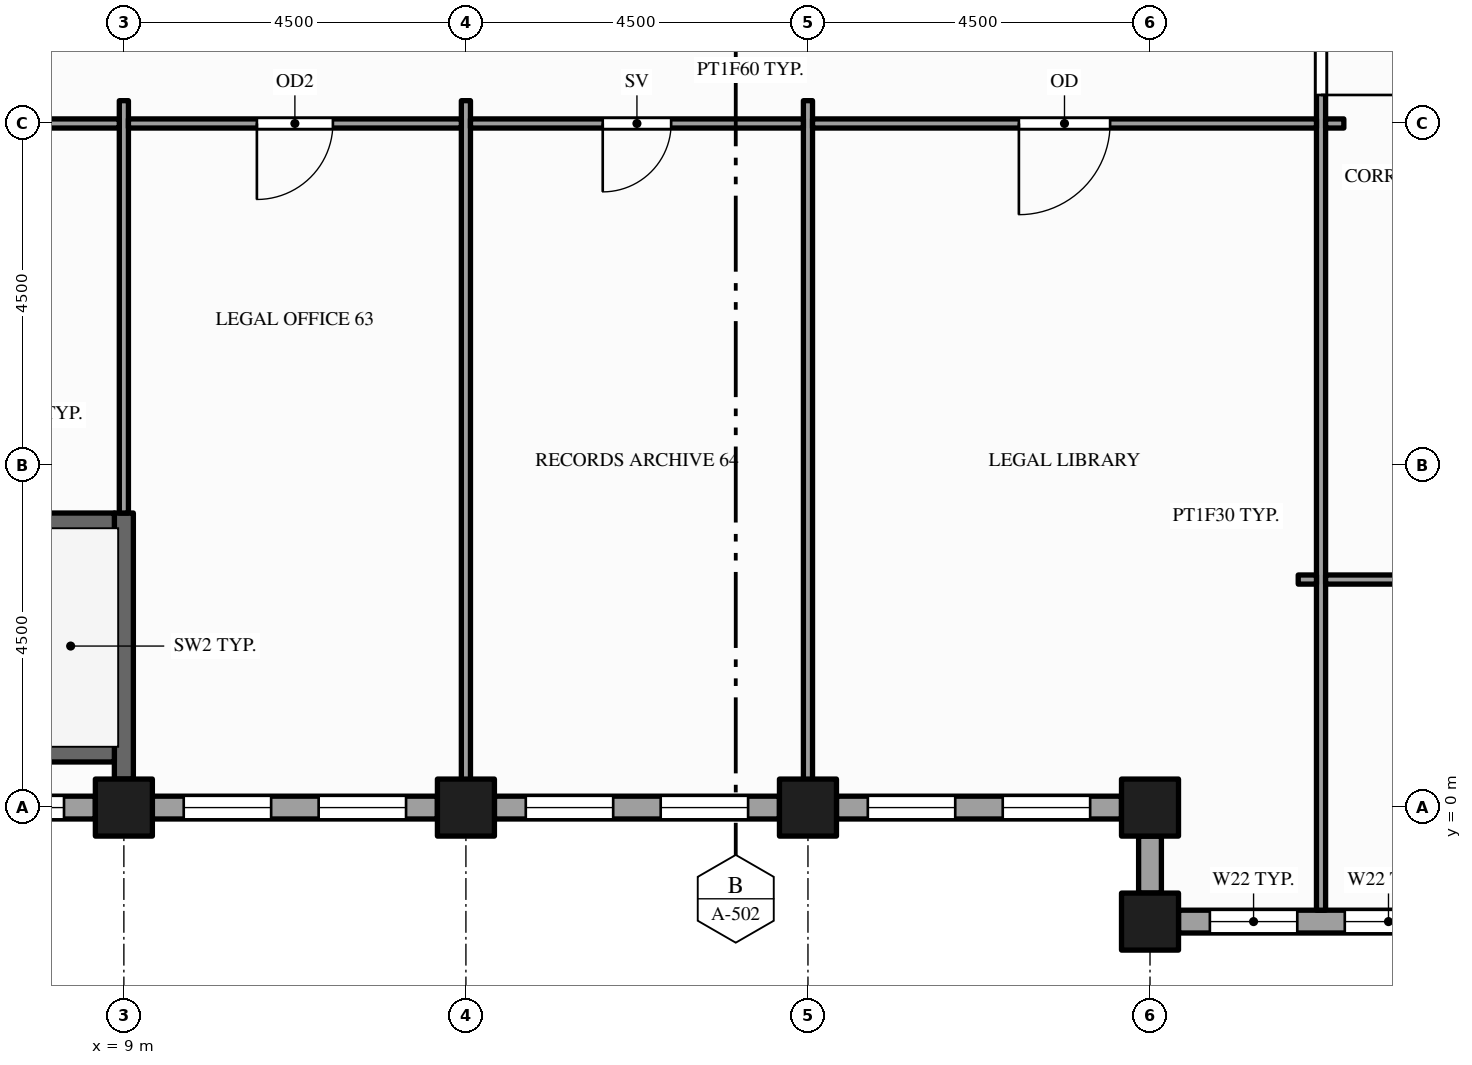
"""IFC4 building model, lengths in metres.
Left out: names, types, materials, properties, quantities, classifications, styles, units other than length and angle.
Written with IfcOpenShell. Run it as: python <this file> out.ifc"""

import sys

from ifc_helpers import new_model, si_unit, direction, frame, frame_2d, origin, origin_2d, place, context, subcontext, project, spatial, rectangle, hollow_rectangle, extrude, element, fill, save


model = new_model("IFC4")
c1 = context("Model", 3, precision=1e-05, world=origin(), true_north=direction((0.0, 1.0)))
c2 = subcontext(c1, "Body", "Model", "MODEL_VIEW")
j1 = project(units=[si_unit("LENGTHUNIT", "METRE"), si_unit("PLANEANGLEUNIT", "RADIAN")], contexts=[c1])
p1 = place(None, origin())
s1 = spatial("IfcSite", under=j1, at=p1, CompositionType="ELEMENT")
p2 = place(p1, origin())
s2 = spatial("IfcBuilding", under=s1, at=p2, CompositionType="ELEMENT")
p3 = place(p2, frame((0.0, 0.0, 195.0)))
s3 = spatial("IfcBuildingStorey", under=s2, at=p3, CompositionType="ELEMENT", Elevation=195.0)
for number, where, z_axis, x_axis in (
    (1, (9.0, 0.0, -0.15), (0.0, 0.0, 1.0), (1.0, 0.0, 0.0)),
    (2, (13.5, 0.0, -0.15), (0.0, 0.0, 1.0), (1.0, 0.0, 0.0)),
    (3, (18.0, 0.0, -0.15), (0.0, 0.0, 1.0), (1.0, 0.0, 0.0)),
    (4, (22.5, -1.5, -0.15), (0.0, 0.0, 1.0), (1.0, 0.0, 0.0)),
    (5, (22.5, 0.0, -0.15), (0.0, 0.0, 1.0), (1.0, 0.0, 0.0)),
):
    element("IfcColumn", number, at=place(p3, frame(where, z_axis=z_axis, x_axis=x_axis)), inside=s3, PredefinedType="COLUMN", context=c2, shape_type="SweptSolid", body=[
        extrude(hollow_rectangle(XDim=0.75, YDim=0.75, WallThickness=0.036, at=origin_2d()), origin(), (0.0, 0.0, 1.0), 4.0),
    ])
p4 = place(p3, frame((22.875, -1.5, 0.0), z_axis=(0.0, 0.0, 1.0), x_axis=(1.0, 0.0, 0.0)))
e6 = element("IfcWall", 6, at=p4, inside=s3, PredefinedType="STANDARD", context=c2, shape_type="SweptSolid", body=[
    extrude(rectangle(XDim=3.75, YDim=0.3, at=frame_2d((1.875, 0.0))), origin(), (0.0, 0.0, 1.0), 2.76),
])
p5 = place(p4, frame((0.413, 0.0, 0.9)))
e7 = element("IfcOpeningElement", 7, at=p5, cuts=e6, PredefinedType="OPENING", context=c2, shape_type="SweptSolid", body=[
    extrude(rectangle(XDim=1.15, YDim=1.5, at=frame_2d((0.575, 0.75))), frame((0.0, 0.16, 0.0), z_axis=(0.0, -1.0, 0.0), x_axis=(1.0, 0.0, 0.0)), (0.0, 0.0, 1.0), 0.32),
])
p6 = place(p4, frame((2.188, 0.0, 0.9)))
e8 = element("IfcOpeningElement", 8, at=p6, cuts=e6, PredefinedType="OPENING", context=c2, shape_type="SweptSolid", body=[
    extrude(rectangle(XDim=1.15, YDim=1.5, at=frame_2d((0.575, 0.75))), frame((0.0, 0.16, 0.0), z_axis=(0.0, -1.0, 0.0), x_axis=(1.0, 0.0, 0.0)), (0.0, 0.0, 1.0), 0.32),
])
p7 = place(p3, frame((4.875, 0.0, 0.0), z_axis=(0.0, 0.0, 1.0), x_axis=(1.0, 0.0, 0.0)))
e9 = element("IfcWall", 9, at=p7, inside=s3, PredefinedType="STANDARD", context=c2, shape_type="SweptSolid", body=[
    extrude(rectangle(XDim=3.75, YDim=0.3, at=frame_2d((1.875, 0.0))), origin(), (0.0, 0.0, 1.0), 3.157),
])
p8 = place(p7, frame((0.413, 0.0, 0.9)))
e10 = element("IfcOpeningElement", 10, at=p8, cuts=e9, PredefinedType="OPENING", context=c2, shape_type="SweptSolid", body=[
    extrude(rectangle(XDim=1.15, YDim=2.0, at=frame_2d((0.575, 1.0))), frame((0.0, 0.16, 0.0), z_axis=(0.0, -1.0, 0.0), x_axis=(1.0, 0.0, 0.0)), (0.0, 0.0, 1.0), 0.32),
])
p9 = place(p7, frame((2.188, 0.0, 0.9)))
e11 = element("IfcOpeningElement", 11, at=p9, cuts=e9, PredefinedType="OPENING", context=c2, shape_type="SweptSolid", body=[
    extrude(rectangle(XDim=1.15, YDim=2.0, at=frame_2d((0.575, 1.0))), frame((0.0, 0.16, 0.0), z_axis=(0.0, -1.0, 0.0), x_axis=(1.0, 0.0, 0.0)), (0.0, 0.0, 1.0), 0.32),
])
p10 = place(p3, frame((9.375, 0.0, 0.0), z_axis=(0.0, 0.0, 1.0), x_axis=(1.0, 0.0, 0.0)))
e12 = element("IfcWall", 12, at=p10, inside=s3, PredefinedType="STANDARD", context=c2, shape_type="SweptSolid", body=[
    extrude(rectangle(XDim=3.75, YDim=0.3, at=frame_2d((1.875, 0.0))), origin(), (0.0, 0.0, 1.0), 2.87),
])
p11 = place(p10, frame((0.413, 0.0, 0.9)))
e13 = element("IfcOpeningElement", 13, at=p11, cuts=e12, PredefinedType="OPENING", context=c2, shape_type="SweptSolid", body=[
    extrude(rectangle(XDim=1.15, YDim=1.75, at=frame_2d((0.575, 0.875))), frame((0.0, 0.16, 0.0), z_axis=(0.0, -1.0, 0.0), x_axis=(1.0, 0.0, 0.0)), (0.0, 0.0, 1.0), 0.32),
])
p12 = place(p10, frame((2.188, 0.0, 0.9)))
e14 = element("IfcOpeningElement", 14, at=p12, cuts=e12, PredefinedType="OPENING", context=c2, shape_type="SweptSolid", body=[
    extrude(rectangle(XDim=1.15, YDim=1.75, at=frame_2d((0.575, 0.875))), frame((0.0, 0.16, 0.0), z_axis=(0.0, -1.0, 0.0), x_axis=(1.0, 0.0, 0.0)), (0.0, 0.0, 1.0), 0.32),
])
p13 = place(p3, frame((13.875, 0.0, 0.0), z_axis=(0.0, 0.0, 1.0), x_axis=(1.0, 0.0, 0.0)))
e15 = element("IfcWall", 15, at=p13, inside=s3, PredefinedType="STANDARD", context=c2, shape_type="SweptSolid", body=[
    extrude(rectangle(XDim=3.75, YDim=0.3, at=frame_2d((1.875, 0.0))), origin(), (0.0, 0.0, 1.0), 2.87),
])
p14 = place(p13, frame((0.413, 0.0, 0.9)))
e16 = element("IfcOpeningElement", 16, at=p14, cuts=e15, PredefinedType="OPENING", context=c2, shape_type="SweptSolid", body=[
    extrude(rectangle(XDim=1.15, YDim=1.75, at=frame_2d((0.575, 0.875))), frame((0.0, 0.16, 0.0), z_axis=(0.0, -1.0, 0.0), x_axis=(1.0, 0.0, 0.0)), (0.0, 0.0, 1.0), 0.32),
])
p15 = place(p13, frame((2.188, 0.0, 0.9)))
e17 = element("IfcOpeningElement", 17, at=p15, cuts=e15, PredefinedType="OPENING", context=c2, shape_type="SweptSolid", body=[
    extrude(rectangle(XDim=1.15, YDim=1.75, at=frame_2d((0.575, 0.875))), frame((0.0, 0.16, 0.0), z_axis=(0.0, -1.0, 0.0), x_axis=(1.0, 0.0, 0.0)), (0.0, 0.0, 1.0), 0.32),
])
p16 = place(p3, frame((18.375, 0.0, 0.0), z_axis=(0.0, 0.0, 1.0), x_axis=(1.0, 0.0, 0.0)))
e18 = element("IfcWall", 18, at=p16, inside=s3, PredefinedType="STANDARD", context=c2, shape_type="SweptSolid", body=[
    extrude(rectangle(XDim=3.75, YDim=0.3, at=frame_2d((1.875, 0.0))), origin(), (0.0, 0.0, 1.0), 2.87),
])
p17 = place(p16, frame((0.413, 0.0, 0.9)))
e19 = element("IfcOpeningElement", 19, at=p17, cuts=e18, PredefinedType="OPENING", context=c2, shape_type="SweptSolid", body=[
    extrude(rectangle(XDim=1.15, YDim=1.75, at=frame_2d((0.575, 0.875))), frame((0.0, 0.16, 0.0), z_axis=(0.0, -1.0, 0.0), x_axis=(1.0, 0.0, 0.0)), (0.0, 0.0, 1.0), 0.32),
])
p18 = place(p16, frame((2.188, 0.0, 0.9)))
e20 = element("IfcOpeningElement", 20, at=p18, cuts=e18, PredefinedType="OPENING", context=c2, shape_type="SweptSolid", body=[
    extrude(rectangle(XDim=1.15, YDim=1.75, at=frame_2d((0.575, 0.875))), frame((0.0, 0.16, 0.0), z_axis=(0.0, -1.0, 0.0), x_axis=(1.0, 0.0, 0.0)), (0.0, 0.0, 1.0), 0.32),
])
p19 = place(p3, frame((22.5, -0.375, 0.0), z_axis=(0.0, 0.0, 1.0), x_axis=(0.0, -1.0, 0.0)))
e21 = element("IfcWall", 21, at=p19, inside=s3, PredefinedType="STANDARD", context=c2, shape_type="SweptSolid", body=[
    extrude(rectangle(XDim=0.75, YDim=0.3, at=frame_2d((0.375, 0.0))), origin(), (0.0, 0.0, 1.0), 3.157),
])
p20 = place(p3, frame((9.0, 0.375, 0.0), z_axis=(0.0, 0.0, 1.0), x_axis=(0.0, 1.0, 0.0)))
e22 = element("IfcWall", 22, at=p20, inside=s3, PredefinedType="SHEAR", context=c2, shape_type="SweptSolid", body=[
    extrude(rectangle(XDim=3.5, YDim=0.25, at=frame_2d((1.75, 0.0))), origin(), (0.0, 0.0, 1.0), 3.85),
])
p21 = place(p3, frame((9.0, 3.875, 0.0), z_axis=(0.0, 0.0, 1.0), x_axis=(0.0, 1.0, 0.0)))
e23 = element("IfcWall", 23, at=p21, inside=s3, PredefinedType="PARTITIONING", context=c2, shape_type="SweptSolid", body=[
    extrude(rectangle(XDim=5.425, YDim=0.12, at=frame_2d((2.712, 0.0))), origin(), (0.0, 0.0, 1.0), 2.87),
])
for number, where, z_axis, x_axis in (
    (24, (13.5, 0.15, 0.0), (0.0, 0.0, 1.0), (0.0, 1.0, 0.0)),
    (25, (18.0, 0.15, 0.0), (0.0, 0.0, 1.0), (0.0, 1.0, 0.0)),
):
    element("IfcWall", number, at=place(p3, frame(where, z_axis=z_axis, x_axis=x_axis)), inside=s3, PredefinedType="PARTITIONING", context=c2, shape_type="SweptSolid", body=[
        extrude(rectangle(XDim=9.15, YDim=0.12, at=frame_2d((4.575, 0.0))), origin(), (0.0, 0.0, 1.0), 2.87),
    ])
p22 = place(p3, frame((24.75, -1.35, 0.0), z_axis=(0.0, 0.0, 1.0), x_axis=(0.0, 1.0, 0.0)))
e26 = element("IfcWall", 26, at=p22, inside=s3, PredefinedType="PARTITIONING", context=c2, shape_type="SweptSolid", body=[
    extrude(rectangle(XDim=24.101, YDim=0.12, at=frame_2d((12.05, 0.0))), origin(), (0.0, 0.0, 1.0), 2.76),
])
p23 = place(p22, frame((10.725, 0.0, 0.0)))
e27 = element("IfcOpeningElement", 27, at=p23, cuts=e26, PredefinedType="OPENING", context=c2, shape_type="SweptSolid", body=[
    extrude(rectangle(XDim=1.5, YDim=2.1, at=frame_2d((0.75, 1.05))), frame((0.0, 0.07, 0.0), z_axis=(0.0, -1.0, 0.0), x_axis=(1.0, 0.0, 0.0)), (0.0, 0.0, 1.0), 0.14),
])
p24 = place(p22, frame((14.625, 0.0, 0.0)))
e28 = element("IfcOpeningElement", 28, at=p24, cuts=e26, PredefinedType="OPENING", context=c2, shape_type="SweptSolid", body=[
    extrude(rectangle(XDim=1.2, YDim=2.1, at=frame_2d((0.6, 1.05))), frame((0.0, 0.07, 0.0), z_axis=(0.0, -1.0, 0.0), x_axis=(1.0, 0.0, 0.0)), (0.0, 0.0, 1.0), 0.14),
])
p25 = place(p3, frame((0.85, 0.725, 0.0), z_axis=(0.0, 0.0, 1.0), x_axis=(1.0, 0.0, 0.0)))
e29 = element("IfcWall", 29, at=p25, inside=s3, PredefinedType="SHEAR", context=c2, shape_type="SweptSolid", body=[
    extrude(rectangle(XDim=8.025, YDim=0.25, at=frame_2d((4.012, 0.0))), origin(), (0.0, 0.0, 1.0), 3.85),
])
p26 = place(p3, frame((24.45, 3.0, 0.0), z_axis=(0.0, 0.0, 1.0), x_axis=(1.0, 0.0, 0.0)))
e30 = element("IfcWall", 30, at=p26, inside=s3, PredefinedType="PARTITIONING", context=c2, shape_type="SweptSolid", body=[
    extrude(rectangle(XDim=0.24, YDim=0.12, at=frame_2d((0.12, 0.0))), origin(), (0.0, 0.0, 1.0), 2.76),
])
p27 = place(p3, frame((24.81, 3.0, 0.0), z_axis=(0.0, 0.0, 1.0), x_axis=(1.0, 0.0, 0.0)))
e31 = element("IfcWall", 31, at=p27, inside=s3, PredefinedType="PARTITIONING", context=c2, shape_type="SweptSolid", body=[
    extrude(rectangle(XDim=2.13, YDim=0.12, at=frame_2d((1.065, 0.0))), origin(), (0.0, 0.0, 1.0), 2.76),
])
p28 = place(p3, frame((0.85, 3.75, 0.0), z_axis=(0.0, 0.0, 1.0), x_axis=(1.0, 0.0, 0.0)))
e32 = element("IfcWall", 32, at=p28, inside=s3, PredefinedType="SHEAR", context=c2, shape_type="SweptSolid", body=[
    extrude(rectangle(XDim=8.025, YDim=0.25, at=frame_2d((4.012, 0.0))), origin(), (0.0, 0.0, 1.0), 3.85),
])
p29 = place(p28, frame((0.15, 0.0, 0.0)))
e33 = element("IfcOpeningElement", 33, at=p29, cuts=e32, PredefinedType="OPENING", context=c2, shape_type="SweptSolid", body=[
    extrude(rectangle(XDim=1.1, YDim=2.1, at=frame_2d((0.55, 1.05))), frame((0.0, 0.135, 0.0), z_axis=(0.0, -1.0, 0.0), x_axis=(1.0, 0.0, 0.0)), (0.0, 0.0, 1.0), 0.27),
])
p30 = place(p3, frame((0.15, 9.0, 0.0), z_axis=(0.0, 0.0, 1.0), x_axis=(1.0, 0.0, 0.0)))
e34 = element("IfcWall", 34, at=p30, inside=s3, PredefinedType="PARTITIONING", context=c2, shape_type="SweptSolid", body=[
    extrude(rectangle(XDim=8.79, YDim=0.12, at=frame_2d((4.395, 0.0))), origin(), (0.0, 0.0, 1.0), 2.87),
])
p31 = place(p30, frame((3.805, 0.0, 0.0)))
e35 = element("IfcOpeningElement", 35, at=p31, cuts=e34, PredefinedType="OPENING", context=c2, shape_type="SweptSolid", body=[
    extrude(rectangle(XDim=1.2, YDim=2.1, at=frame_2d((0.6, 1.05))), frame((0.0, 0.07, 0.0), z_axis=(0.0, -1.0, 0.0), x_axis=(1.0, 0.0, 0.0)), (0.0, 0.0, 1.0), 0.14),
])
p32 = place(p3, frame((9.06, 9.0, 0.0), z_axis=(0.0, 0.0, 1.0), x_axis=(1.0, 0.0, 0.0)))
e36 = element("IfcWall", 36, at=p32, inside=s3, PredefinedType="PARTITIONING", context=c2, shape_type="SweptSolid", body=[
    extrude(rectangle(XDim=4.38, YDim=0.12, at=frame_2d((2.19, 0.0))), origin(), (0.0, 0.0, 1.0), 2.87),
])
p33 = place(p32, frame((1.69, 0.0, 0.0)))
e37 = element("IfcOpeningElement", 37, at=p33, cuts=e36, PredefinedType="OPENING", context=c2, shape_type="SweptSolid", body=[
    extrude(rectangle(XDim=1.0, YDim=2.1, at=frame_2d((0.5, 1.05))), frame((0.0, 0.07, 0.0), z_axis=(0.0, -1.0, 0.0), x_axis=(1.0, 0.0, 0.0)), (0.0, 0.0, 1.0), 0.14),
])
p34 = place(p3, frame((13.56, 9.0, 0.0), z_axis=(0.0, 0.0, 1.0), x_axis=(1.0, 0.0, 0.0)))
e38 = element("IfcWall", 38, at=p34, inside=s3, PredefinedType="PARTITIONING", context=c2, shape_type="SweptSolid", body=[
    extrude(rectangle(XDim=4.38, YDim=0.12, at=frame_2d((2.19, 0.0))), origin(), (0.0, 0.0, 1.0), 2.87),
])
p35 = place(p34, frame((1.74, 0.0, 0.0)))
e39 = element("IfcOpeningElement", 39, at=p35, cuts=e38, PredefinedType="OPENING", context=c2, shape_type="SweptSolid", body=[
    extrude(rectangle(XDim=0.9, YDim=2.1, at=frame_2d((0.45, 1.05))), frame((0.0, 0.07, 0.0), z_axis=(0.0, -1.0, 0.0), x_axis=(1.0, 0.0, 0.0)), (0.0, 0.0, 1.0), 0.14),
])
p36 = place(p3, frame((18.06, 9.0, 0.0), z_axis=(0.0, 0.0, 1.0), x_axis=(1.0, 0.0, 0.0)))
e40 = element("IfcWall", 40, at=p36, inside=s3, PredefinedType="PARTITIONING", context=c2, shape_type="SweptSolid", body=[
    extrude(rectangle(XDim=6.63, YDim=0.12, at=frame_2d((3.315, 0.0))), origin(), (0.0, 0.0, 1.0), 2.76),
])
p37 = place(p36, frame((2.715, 0.0, 0.0)))
e41 = element("IfcOpeningElement", 41, at=p37, cuts=e40, PredefinedType="OPENING", context=c2, shape_type="SweptSolid", body=[
    extrude(rectangle(XDim=1.2, YDim=2.1, at=frame_2d((0.6, 1.05))), frame((0.0, 0.07, 0.0), z_axis=(0.0, -1.0, 0.0), x_axis=(1.0, 0.0, 0.0)), (0.0, 0.0, 1.0), 0.14),
])
p38 = place(p3, frame((24.81, 9.0, 0.0), z_axis=(0.0, 0.0, 1.0), x_axis=(1.0, 0.0, 0.0)))
e42 = element("IfcWall", 42, at=p38, inside=s3, PredefinedType="PARTITIONING", context=c2, shape_type="SweptSolid", body=[
    extrude(rectangle(XDim=0.24, YDim=0.12, at=frame_2d((0.12, 0.0))), origin(), (0.0, 0.0, 1.0), 2.76),
])
p39 = place(p5, origin())
e43 = element("IfcWindow", 43, at=p39, inside=s3, PartitioningType="SINGLE_PANEL", PredefinedType="WINDOW", context=c2, shape_type="SweptSolid", body=[
    extrude(rectangle(XDim=1.15, YDim=1.5, at=frame_2d((0.575, 0.75))), frame((0.0, 0.03, 0.0), z_axis=(0.0, -1.0, 0.0), x_axis=(1.0, 0.0, 0.0)), (0.0, 0.0, 1.0), 0.06),
])
fill(e7, e43)
p40 = place(p6, origin())
e44 = element("IfcWindow", 44, at=p40, inside=s3, PartitioningType="SINGLE_PANEL", PredefinedType="WINDOW", context=c2, shape_type="SweptSolid", body=[
    extrude(rectangle(XDim=1.15, YDim=1.5, at=frame_2d((0.575, 0.75))), frame((0.0, 0.03, 0.0), z_axis=(0.0, -1.0, 0.0), x_axis=(1.0, 0.0, 0.0)), (0.0, 0.0, 1.0), 0.06),
])
fill(e8, e44)
p41 = place(p9, origin())
e45 = element("IfcWindow", 45, at=p41, inside=s3, PartitioningType="SINGLE_PANEL", PredefinedType="WINDOW", context=c2, shape_type="SweptSolid", body=[
    extrude(rectangle(XDim=1.15, YDim=2.0, at=frame_2d((0.575, 1.0))), frame((0.0, 0.03, 0.0), z_axis=(0.0, -1.0, 0.0), x_axis=(1.0, 0.0, 0.0)), (0.0, 0.0, 1.0), 0.06),
])
fill(e11, e45)
p42 = place(p11, origin())
e46 = element("IfcWindow", 46, at=p42, inside=s3, PartitioningType="SINGLE_PANEL", PredefinedType="WINDOW", context=c2, shape_type="SweptSolid", body=[
    extrude(rectangle(XDim=1.15, YDim=1.75, at=frame_2d((0.575, 0.875))), frame((0.0, 0.03, 0.0), z_axis=(0.0, -1.0, 0.0), x_axis=(1.0, 0.0, 0.0)), (0.0, 0.0, 1.0), 0.06),
])
fill(e13, e46)
p43 = place(p12, origin())
e47 = element("IfcWindow", 47, at=p43, inside=s3, PartitioningType="SINGLE_PANEL", PredefinedType="WINDOW", context=c2, shape_type="SweptSolid", body=[
    extrude(rectangle(XDim=1.15, YDim=1.75, at=frame_2d((0.575, 0.875))), frame((0.0, 0.03, 0.0), z_axis=(0.0, -1.0, 0.0), x_axis=(1.0, 0.0, 0.0)), (0.0, 0.0, 1.0), 0.06),
])
fill(e14, e47)
p44 = place(p14, origin())
e48 = element("IfcWindow", 48, at=p44, inside=s3, PartitioningType="SINGLE_PANEL", PredefinedType="WINDOW", context=c2, shape_type="SweptSolid", body=[
    extrude(rectangle(XDim=1.15, YDim=1.75, at=frame_2d((0.575, 0.875))), frame((0.0, 0.03, 0.0), z_axis=(0.0, -1.0, 0.0), x_axis=(1.0, 0.0, 0.0)), (0.0, 0.0, 1.0), 0.06),
])
fill(e16, e48)
p45 = place(p15, origin())
e49 = element("IfcWindow", 49, at=p45, inside=s3, PartitioningType="SINGLE_PANEL", PredefinedType="WINDOW", context=c2, shape_type="SweptSolid", body=[
    extrude(rectangle(XDim=1.15, YDim=1.75, at=frame_2d((0.575, 0.875))), frame((0.0, 0.03, 0.0), z_axis=(0.0, -1.0, 0.0), x_axis=(1.0, 0.0, 0.0)), (0.0, 0.0, 1.0), 0.06),
])
fill(e17, e49)
p46 = place(p17, origin())
e50 = element("IfcWindow", 50, at=p46, inside=s3, PartitioningType="SINGLE_PANEL", PredefinedType="WINDOW", context=c2, shape_type="SweptSolid", body=[
    extrude(rectangle(XDim=1.15, YDim=1.75, at=frame_2d((0.575, 0.875))), frame((0.0, 0.03, 0.0), z_axis=(0.0, -1.0, 0.0), x_axis=(1.0, 0.0, 0.0)), (0.0, 0.0, 1.0), 0.06),
])
fill(e19, e50)
p47 = place(p18, origin())
e51 = element("IfcWindow", 51, at=p47, inside=s3, PartitioningType="SINGLE_PANEL", PredefinedType="WINDOW", context=c2, shape_type="SweptSolid", body=[
    extrude(rectangle(XDim=1.15, YDim=1.75, at=frame_2d((0.575, 0.875))), frame((0.0, 0.03, 0.0), z_axis=(0.0, -1.0, 0.0), x_axis=(1.0, 0.0, 0.0)), (0.0, 0.0, 1.0), 0.06),
])
fill(e20, e51)
p48 = place(p23, origin())
e52 = element("IfcDoor", 52, at=p48, inside=s3, OperationType="SINGLE_SWING_LEFT", PredefinedType="DOOR", context=c2, shape_type="SweptSolid", body=[
    extrude(rectangle(XDim=1.5, YDim=2.1, at=frame_2d((0.75, 1.05))), frame((0.0, 0.025, 0.0), z_axis=(0.0, -1.0, 0.0), x_axis=(1.0, 0.0, 0.0)), (0.0, 0.0, 1.0), 0.05),
])
fill(e27, e52)
p49 = place(p33, origin())
e53 = element("IfcDoor", 53, at=p49, inside=s3, OperationType="SINGLE_SWING_LEFT", PredefinedType="DOOR", context=c2, shape_type="SweptSolid", body=[
    extrude(rectangle(XDim=1.0, YDim=2.1, at=frame_2d((0.5, 1.05))), frame((0.0, 0.025, 0.0), z_axis=(0.0, -1.0, 0.0), x_axis=(1.0, 0.0, 0.0)), (0.0, 0.0, 1.0), 0.05),
])
fill(e37, e53)
p50 = place(p35, origin())
e54 = element("IfcDoor", 54, at=p50, inside=s3, OperationType="SINGLE_SWING_LEFT", PredefinedType="DOOR", context=c2, shape_type="SweptSolid", body=[
    extrude(rectangle(XDim=0.9, YDim=2.1, at=frame_2d((0.45, 1.05))), frame((0.0, 0.025, 0.0), z_axis=(0.0, -1.0, 0.0), x_axis=(1.0, 0.0, 0.0)), (0.0, 0.0, 1.0), 0.05),
])
fill(e39, e54)
p51 = place(p37, origin())
e55 = element("IfcDoor", 55, at=p51, inside=s3, OperationType="SINGLE_SWING_LEFT", PredefinedType="DOOR", context=c2, shape_type="SweptSolid", body=[
    extrude(rectangle(XDim=1.2, YDim=2.1, at=frame_2d((0.6, 1.05))), frame((0.0, 0.025, 0.0), z_axis=(0.0, -1.0, 0.0), x_axis=(1.0, 0.0, 0.0)), (0.0, 0.0, 1.0), 0.05),
])
fill(e41, e55)
save(model, sys.argv[1])
